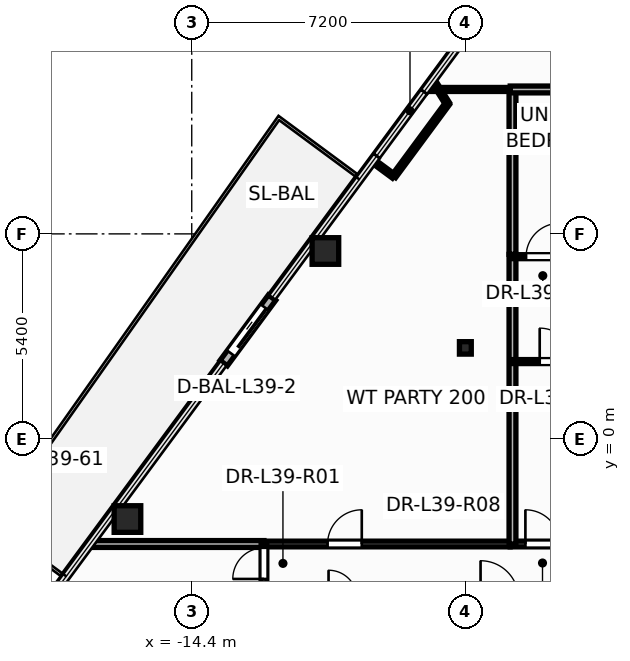
"""IFC4 building model, lengths in metres.
Left out: names, types, materials, properties, quantities, classifications, styles, units other than length and angle.
Written with IfcOpenShell. Run it as: python <this file> out.ifc"""

import sys

from ifc_helpers import new_model, si_unit, direction, frame, frame_2d, origin, origin_2d, place, context, subcontext, project, spatial, rectangle, hollow_circle, i_section, extrude, element, fill, save


model = new_model("IFC4")
c1 = context("Model", 3, precision=1e-05, world=origin(), true_north=direction((0.0, 1.0)))
c2 = subcontext(c1, "Body", "Model", "MODEL_VIEW")
j1 = project(units=[si_unit("LENGTHUNIT", "METRE"), si_unit("PLANEANGLEUNIT", "RADIAN")], contexts=[c1])
p1 = place(None, origin())
s1 = spatial("IfcSite", under=j1, at=p1, CompositionType="ELEMENT")
p2 = place(p1, origin())
s2 = spatial("IfcBuilding", under=s1, at=p2, CompositionType="ELEMENT")
p3 = place(p2, frame((0.0, 0.0, 150.9)))
s3 = spatial("IfcBuildingStorey", under=s2, at=p3, CompositionType="ELEMENT", Elevation=150.9)
for number, where, z_axis, x_axis in (
    (1, (-10.883, 4.95, 0.0), (0.0, 0.0, 1.0), (1.0, 0.0, 0.0)),
    (2, (-16.092, -2.103, 0.0), (0.0, 0.0, 1.0), (1.0, 0.0, 0.0)),
):
    element("IfcColumn", number, at=place(p3, frame(where, z_axis=z_axis, x_axis=x_axis)), inside=s3, PredefinedType="COLUMN", context=c2, shape_type="SweptSolid", body=[
        extrude(hollow_circle(Radius=0.35, WallThickness=0.03, at=origin_2d()), origin(), (0.0, 0.0, 1.0), 3.6),
    ])
p4 = place(p3, frame((-7.2, 2.4, 0.0), z_axis=(0.0, 0.0, 1.0), x_axis=(1.0, 0.0, 0.0)))
e3 = element("IfcColumn", 3, at=p4, inside=s3, PredefinedType="COLUMN", context=c2, shape_type="SweptSolid", body=[
    extrude(i_section(OverallWidth=0.311, OverallDepth=0.327, WebThickness=0.016, FlangeThickness=0.025, at=origin_2d()), origin(), (0.0, 0.0, 1.0), 3.6),
])
p5 = place(p3, frame((-12.288, 3.721, -0.015), z_axis=(0.0, 0.0, 1.0), x_axis=(-0.593996463284, -0.804467651062, 0.0)))
e4 = element("IfcWall", 4, at=p5, inside=s3, PredefinedType="STANDARD", context=c2, shape_type="SweptSolid", body=[
    extrude(rectangle(XDim=2.14, YDim=0.24, at=frame_2d((1.07, 0.0))), origin(), (0.0, 0.0, 1.0), 2.807),
])
p6 = place(p5, frame((0.32, 0.0, 0.015)))
e5 = element("IfcOpeningElement", 5, at=p6, cuts=e4, PredefinedType="OPENING", context=c2, shape_type="SweptSolid", body=[
    extrude(rectangle(XDim=1.506, YDim=2.204, at=frame_2d((0.75, 1.102))), frame((0.0, 0.13, 0.0), z_axis=(0.0, -1.0, 0.0), x_axis=(1.0, 0.0, 0.0)), (0.0, 0.0, 1.0), 0.26),
])
p7 = place(p3, frame((-6.02, -2.76, 0.0), z_axis=(0.0, 0.0, 1.0), x_axis=(1.0, 0.0, 0.0)))
e6 = element("IfcWall", 6, at=p7, inside=s3, PredefinedType="PARTITIONING", context=c2, shape_type="SweptSolid", body=[
    extrude(rectangle(XDim=6.66, YDim=0.15, at=frame_2d((3.33, 0.0))), origin(), (0.0, 0.0, 1.0), 2.325),
])
p8 = place(p7, frame((0.4, 0.0, 0.0)))
e7 = element("IfcOpeningElement", 7, at=p8, cuts=e6, PredefinedType="OPENING", context=c2, shape_type="SweptSolid", body=[
    extrude(rectangle(XDim=0.906, YDim=2.104, at=frame_2d((0.45, 1.052))), frame((0.0, 0.085, 0.0), z_axis=(0.0, -1.0, 0.0), x_axis=(1.0, 0.0, 0.0)), (0.0, 0.0, 1.0), 0.17),
])
p9 = place(p3, frame((-12.5, -2.76, 0.0), z_axis=(0.0, 0.0, 1.0), x_axis=(1.0, 0.0, 0.0)))
e8 = element("IfcWall", 8, at=p9, inside=s3, PredefinedType="PARTITIONING", context=c2, shape_type="SweptSolid", body=[
    extrude(rectangle(XDim=6.478, YDim=0.15, at=frame_2d((3.239, 0.0))), origin(), (0.0, 0.0, 1.0), 2.325),
])
p10 = place(p9, frame((1.674, 0.0, 0.0)))
e9 = element("IfcOpeningElement", 9, at=p10, cuts=e8, PredefinedType="OPENING", context=c2, shape_type="SweptSolid", body=[
    extrude(rectangle(XDim=0.906, YDim=2.104, at=frame_2d((0.45, 1.052))), frame((0.0, 0.085, 0.0), z_axis=(0.0, -1.0, 0.0), x_axis=(1.0, 0.0, 0.0)), (0.0, 0.0, 1.0), 0.17),
])
p11 = place(p3, frame((-5.96, -2.76, 0.0), z_axis=(0.0, 0.0, 1.0), x_axis=(0.0, 1.0, 0.0)))
e10 = element("IfcWall", 10, at=p11, inside=s3, PredefinedType="PARTITIONING", context=c2, shape_type="SweptSolid", body=[
    extrude(rectangle(XDim=7.62, YDim=0.18, at=frame_2d((3.81, 0.0))), origin(), (0.0, 0.0, 1.0), 2.325),
])
p12 = place(p3, frame((-17.074, -2.76, 0.0), z_axis=(0.0, 0.0, 1.0), x_axis=(1.0, 0.0, 0.0)))
e11 = element("IfcWall", 11, at=p12, inside=s3, PredefinedType="PARTITIONING", context=c2, shape_type="SweptSolid", body=[
    extrude(rectangle(XDim=4.574, YDim=0.18, at=frame_2d((2.287, 0.0))), origin(), (0.0, 0.0, 1.0), 2.792),
])
p13 = place(p3, frame((-5.96, 4.862, 0.0), z_axis=(0.0, 0.0, 1.0), x_axis=(0.0, 1.0, 0.0)))
e12 = element("IfcWall", 12, at=p13, inside=s3, PredefinedType="PARTITIONING", context=c2, shape_type="SweptSolid", body=[
    extrude(rectangle(XDim=4.338, YDim=0.18, at=frame_2d((2.169, 0.0))), origin(), (0.0, 0.0, 1.0), 2.617),
])
p14 = place(p3, frame((-5.96, 2.04, 0.0), z_axis=(0.0, 0.0, 1.0), x_axis=(1.0, 0.0, 0.0)))
e13 = element("IfcWall", 13, at=p14, inside=s3, PredefinedType="PARTITIONING", context=c2, shape_type="SweptSolid", body=[
    extrude(rectangle(XDim=4.42, YDim=0.105, at=frame_2d((2.21, 0.0))), origin(), (0.0, 0.0, 1.0), 2.919),
])
p15 = place(p14, frame((0.716, 0.0, 0.0)))
e14 = element("IfcOpeningElement", 14, at=p15, cuts=e13, PredefinedType="OPENING", context=c2, shape_type="SweptSolid", body=[
    extrude(rectangle(XDim=0.886, YDim=2.104, at=frame_2d((0.44, 1.052))), frame((0.0, 0.062, 0.0), z_axis=(0.0, -1.0, 0.0), x_axis=(1.0, 0.0, 0.0)), (0.0, 0.0, 1.0), 0.125),
])
p16 = place(p3, frame((-6.02, 9.2, 0.0), z_axis=(0.0, 0.0, 1.0), x_axis=(1.0, 0.0, 0.0)))
e15 = element("IfcWall", 15, at=p16, inside=s3, PredefinedType="PARTITIONING", context=c2, shape_type="SweptSolid", body=[
    extrude(rectangle(XDim=6.66, YDim=0.18, at=frame_2d((3.33, 0.0))), origin(), (0.0, 0.0, 1.0), 2.617),
])
p17 = place(p3, frame((-5.96, 4.8, 0.0), z_axis=(0.0, 0.0, 1.0), x_axis=(1.0, 0.0, 0.0)))
e16 = element("IfcWall", 16, at=p17, inside=s3, PredefinedType="PARTITIONING", context=c2, shape_type="SweptSolid", body=[
    extrude(rectangle(XDim=3.1, YDim=0.105, at=frame_2d((1.55, 0.0))), origin(), (0.0, 0.0, 1.0), 3.35),
])
p18 = place(p17, frame((0.358, 0.0, 0.0)))
e17 = element("IfcOpeningElement", 17, at=p18, cuts=e16, PredefinedType="OPENING", context=c2, shape_type="SweptSolid", body=[
    extrude(rectangle(XDim=0.886, YDim=2.104, at=frame_2d((0.44, 1.052))), frame((0.0, 0.062, 0.0), z_axis=(0.0, -1.0, 0.0), x_axis=(1.0, 0.0, 0.0)), (0.0, 0.0, 1.0), 0.125),
])
p19 = place(p3, frame((-7.671, 8.827, 0.0), z_axis=(0.0, 0.0, 1.0), x_axis=(-0.594053249338, -0.804425718728, 0.0)))
e18 = element("IfcWall", 18, at=p19, inside=s3, PredefinedType="PARTITIONING", context=c2, shape_type="SweptSolid", body=[
    extrude(rectangle(XDim=2.378, YDim=0.12, at=frame_2d((1.189, 0.0))), origin(), (0.0, 0.0, 1.0), 3.35),
])
p20 = place(p3, frame((-8.12, 9.2, 0.0), z_axis=(0.0, 0.0, 1.0), x_axis=(1.0, 0.0, 0.0)))
e19 = element("IfcWall", 19, at=p20, inside=s3, PredefinedType="PARTITIONING", context=c2, shape_type="SweptSolid", body=[
    extrude(rectangle(XDim=2.098, YDim=0.105, at=frame_2d((1.049, 0.0))), origin(), (0.0, 0.0, 1.0), 2.792),
])
p21 = place(p3, frame((-12.5, -4.24, 0.0), z_axis=(0.0, 0.0, 1.0), x_axis=(0.0, 1.0, 0.0)))
e20 = element("IfcWall", 20, at=p21, inside=s3, PredefinedType="PARTITIONING", context=c2, shape_type="SweptSolid", body=[
    extrude(rectangle(XDim=1.48, YDim=0.15, at=frame_2d((0.74, 0.0))), origin(), (0.0, 0.0, 1.0), 2.325),
])
p22 = place(p21, frame((0.56, 0.0, 0.0)))
e21 = element("IfcOpeningElement", 21, at=p22, cuts=e20, PredefinedType="OPENING", context=c2, shape_type="SweptSolid", body=[
    extrude(rectangle(XDim=0.826, YDim=2.104, at=frame_2d((0.41, 1.052))), frame((0.0, 0.085, 0.0), z_axis=(0.0, -1.0, 0.0), x_axis=(1.0, 0.0, 0.0)), (0.0, 0.0, 1.0), 0.17),
])
p23 = place(p3, frame((-8.054, 9.437, 0.0), z_axis=(0.0, 0.0, 1.0), x_axis=(0.531553111266, -0.847024964156, 0.0)))
e22 = element("IfcWall", 22, at=p23, inside=s3, PredefinedType="PARTITIONING", context=c2, shape_type="SweptSolid", body=[
    extrude(rectangle(XDim=0.72, YDim=0.12, at=frame_2d((0.36, 0.0))), origin(), (0.0, 0.0, 1.0), 2.792),
])
p24 = place(p3, frame((-9.084, 6.914, 0.0), z_axis=(0.0, 0.0, 1.0), x_axis=(-0.804395751644, 0.594093826543, 0.0)))
e23 = element("IfcWall", 23, at=p24, inside=s3, PredefinedType="PARTITIONING", context=c2, shape_type="SweptSolid", body=[
    extrude(rectangle(XDim=0.67, YDim=0.12, at=frame_2d((0.335, 0.0))), origin(), (0.0, 0.0, 1.0), 2.792),
])
p25 = place(p6, origin())
e24 = element("IfcDoor", 24, at=p25, inside=s3, OperationType="SLIDING_TO_RIGHT", PredefinedType="DOOR", context=c2, shape_type="SweptSolid", body=[
    extrude(rectangle(XDim=1.5, YDim=2.2, at=frame_2d((0.75, 1.1))), frame((0.0, 0.025, 0.0), z_axis=(0.0, -1.0, 0.0), x_axis=(1.0, 0.0, 0.0)), (0.0, 0.0, 1.0), 0.05),
])
fill(e5, e24)
p26 = place(p22, origin())
e25 = element("IfcDoor", 25, at=p26, inside=s3, OperationType="SINGLE_SWING_LEFT", PredefinedType="DOOR", context=c2, shape_type="SweptSolid", body=[
    extrude(rectangle(XDim=0.82, YDim=2.1, at=frame_2d((0.41, 1.05))), frame((0.0, 0.025, 0.0), z_axis=(0.0, -1.0, 0.0), x_axis=(1.0, 0.0, 0.0)), (0.0, 0.0, 1.0), 0.05),
])
fill(e21, e25)
p27 = place(p10, origin())
e26 = element("IfcDoor", 26, at=p27, inside=s3, OperationType="SINGLE_SWING_RIGHT", PredefinedType="DOOR", context=c2, shape_type="SweptSolid", body=[
    extrude(rectangle(XDim=0.9, YDim=2.1, at=frame_2d((0.45, 1.05))), frame((0.0, 0.025, 0.0), z_axis=(0.0, -1.0, 0.0), x_axis=(1.0, 0.0, 0.0)), (0.0, 0.0, 1.0), 0.05),
])
fill(e9, e26)
p28 = place(p8, origin())
e27 = element("IfcDoor", 27, at=p28, inside=s3, OperationType="SINGLE_SWING_LEFT", PredefinedType="DOOR", context=c2, shape_type="SweptSolid", body=[
    extrude(rectangle(XDim=0.9, YDim=2.1, at=frame_2d((0.45, 1.05))), frame((0.0, 0.025, 0.0), z_axis=(0.0, -1.0, 0.0), x_axis=(1.0, 0.0, 0.0)), (0.0, 0.0, 1.0), 0.05),
])
fill(e7, e27)
p29 = place(p15, origin())
e28 = element("IfcDoor", 28, at=p29, inside=s3, OperationType="SINGLE_SWING_LEFT", PredefinedType="DOOR", context=c2, shape_type="SweptSolid", body=[
    extrude(rectangle(XDim=0.88, YDim=2.1, at=frame_2d((0.44, 1.05))), frame((0.0, 0.025, 0.0), z_axis=(0.0, -1.0, 0.0), x_axis=(1.0, 0.0, 0.0)), (0.0, 0.0, 1.0), 0.05),
])
fill(e14, e28)
p30 = place(p18, origin())
e29 = element("IfcDoor", 29, at=p30, inside=s3, OperationType="SINGLE_SWING_RIGHT", PredefinedType="DOOR", context=c2, shape_type="SweptSolid", body=[
    extrude(rectangle(XDim=0.88, YDim=2.1, at=frame_2d((0.44, 1.05))), frame((0.0, 0.025, 0.0), z_axis=(0.0, -1.0, 0.0), x_axis=(1.0, 0.0, 0.0)), (0.0, 0.0, 1.0), 0.05),
])
fill(e17, e29)
save(model, sys.argv[1])
